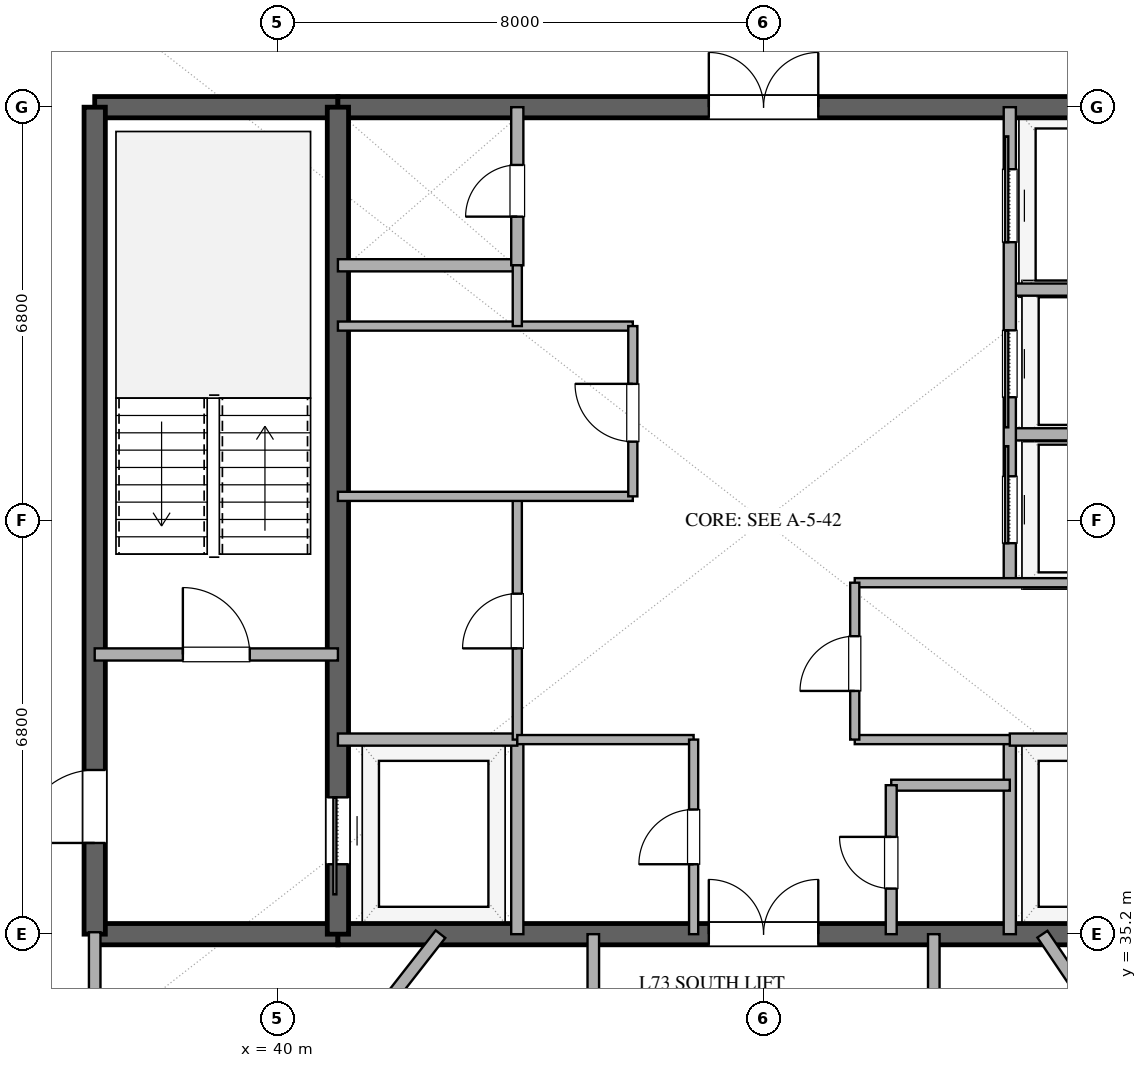
"""IFC4 building model, lengths in metres.
Left out: names, types, materials, properties, quantities, classifications, styles, units other than length and angle.
Written with IfcOpenShell. Run it as: python <this file> out.ifc"""

import sys

from ifc_helpers import new_model, si_unit, direction, frame, frame_2d, origin, place, context, subcontext, project, spatial, rectangle, extrude, element, fill, save


model = new_model("IFC4")
c1 = context("Model", 3, precision=1e-05, world=origin(), true_north=direction((0.0, 1.0)))
c2 = subcontext(c1, "Body", "Model", "MODEL_VIEW")
j1 = project(units=[si_unit("LENGTHUNIT", "METRE"), si_unit("PLANEANGLEUNIT", "RADIAN")], contexts=[c1])
p1 = place(None, origin())
s1 = spatial("IfcSite", under=j1, at=p1, CompositionType="ELEMENT")
p2 = place(p1, origin())
s2 = spatial("IfcBuilding", under=s1, at=p2, CompositionType="ELEMENT")
p3 = place(p2, frame((0.0, 0.0, 283.8)))
s3 = spatial("IfcBuildingStorey", under=s2, at=p3, CompositionType="ELEMENT", Elevation=283.8)
p4 = place(p3, frame((37.0, 35.2, 0.0), z_axis=(0.0, 0.0, 1.0), x_axis=(1.0, 0.0, 0.0)))
e1 = element("IfcWall", 1, at=p4, inside=s3, PredefinedType="SHEAR", context=c2, shape_type="SweptSolid", body=[
    extrude(rectangle(XDim=4.0, YDim=0.35, at=frame_2d((2.0, 0.0))), origin(), (0.0, 0.0, 1.0), 3.37),
])
p5 = place(p3, frame((41.0, 35.2, 0.0), z_axis=(0.0, 0.0, 1.0), x_axis=(1.0, 0.0, 0.0)))
e2 = element("IfcWall", 2, at=p5, inside=s3, PredefinedType="SHEAR", context=c2, shape_type="SweptSolid", body=[
    extrude(rectangle(XDim=14.0, YDim=0.35, at=frame_2d((7.0, 0.0))), origin(), (0.0, 0.0, 1.0), 3.37),
])
p6 = place(p5, frame((6.1, 0.0, 0.0)))
e3 = element("IfcOpeningElement", 3, at=p6, cuts=e2, PredefinedType="OPENING", context=c2, shape_type="SweptSolid", body=[
    extrude(rectangle(XDim=1.8, YDim=2.25, at=frame_2d((0.9, 1.125))), frame((0.0, 0.185, 0.0), z_axis=(0.0, -1.0, 0.0), x_axis=(1.0, 0.0, 0.0)), (0.0, 0.0, 1.0), 0.37),
])
p7 = place(p3, frame((37.0, 48.8, 0.0), z_axis=(0.0, 0.0, 1.0), x_axis=(1.0, 0.0, 0.0)))
e4 = element("IfcWall", 4, at=p7, inside=s3, PredefinedType="SHEAR", context=c2, shape_type="SweptSolid", body=[
    extrude(rectangle(XDim=4.0, YDim=0.35, at=frame_2d((2.0, 0.0))), origin(), (0.0, 0.0, 1.0), 3.37),
])
p8 = place(p3, frame((41.0, 48.8, 0.0), z_axis=(0.0, 0.0, 1.0), x_axis=(1.0, 0.0, 0.0)))
e5 = element("IfcWall", 5, at=p8, inside=s3, PredefinedType="SHEAR", context=c2, shape_type="SweptSolid", body=[
    extrude(rectangle(XDim=14.0, YDim=0.35, at=frame_2d((7.0, 0.0))), origin(), (0.0, 0.0, 1.0), 3.37),
])
p9 = place(p8, frame((6.1, 0.0, 0.0)))
e6 = element("IfcOpeningElement", 6, at=p9, cuts=e5, PredefinedType="OPENING", context=c2, shape_type="SweptSolid", body=[
    extrude(rectangle(XDim=1.8, YDim=2.25, at=frame_2d((0.9, 1.125))), frame((0.0, 0.185, 0.0), z_axis=(0.0, -1.0, 0.0), x_axis=(1.0, 0.0, 0.0)), (0.0, 0.0, 1.0), 0.37),
])
p10 = place(p3, frame((37.0, 35.2, 0.0), z_axis=(0.0, 0.0, 1.0), x_axis=(0.0, 1.0, 0.0)))
e7 = element("IfcWall", 7, at=p10, inside=s3, PredefinedType="SHEAR", context=c2, shape_type="SweptSolid", body=[
    extrude(rectangle(XDim=13.6, YDim=0.35, at=frame_2d((6.8, 0.0))), origin(), (0.0, 0.0, 1.0), 3.37),
])
p11 = place(p10, frame((1.5, 0.0, 0.0)))
e8 = element("IfcOpeningElement", 8, at=p11, cuts=e7, PredefinedType="OPENING", context=c2, shape_type="SweptSolid", body=[
    extrude(rectangle(XDim=1.2, YDim=2.15, at=frame_2d((0.6, 1.075))), frame((0.0, 0.185, 0.0), z_axis=(0.0, -1.0, 0.0), x_axis=(1.0, 0.0, 0.0)), (0.0, 0.0, 1.0), 0.37),
])
p12 = place(p3, frame((41.0, 35.2, 0.0), z_axis=(0.0, 0.0, 1.0), x_axis=(0.0, 1.0, 0.0)))
e9 = element("IfcWall", 9, at=p12, inside=s3, PredefinedType="SHEAR", context=c2, shape_type="SweptSolid", body=[
    extrude(rectangle(XDim=13.6, YDim=0.35, at=frame_2d((6.8, 0.0))), origin(), (0.0, 0.0, 1.0), 3.37),
])
p13 = place(p12, frame((1.15, 0.0, 0.0)))
e10 = element("IfcOpeningElement", 10, at=p13, cuts=e9, PredefinedType="OPENING", context=c2, shape_type="SweptSolid", body=[
    extrude(rectangle(XDim=1.1, YDim=2.2, at=frame_2d((0.55, 1.1))), frame((0.0, 0.185, 0.0), z_axis=(0.0, -1.0, 0.0), x_axis=(1.0, 0.0, 0.0)), (0.0, 0.0, 1.0), 0.37),
])
p14 = place(p3, frame((37.0, 39.8, 0.0), z_axis=(0.0, 0.0, 1.0), x_axis=(1.0, 0.0, 0.0)))
e11 = element("IfcWall", 11, at=p14, inside=s3, PredefinedType="SOLIDWALL", context=c2, shape_type="SweptSolid", body=[
    extrude(rectangle(XDim=4.0, YDim=0.2, at=frame_2d((2.0, 0.0))), origin(), (0.0, 0.0, 1.0), 2.73),
])
p15 = place(p14, frame((1.45, 0.0, 0.0)))
e12 = element("IfcOpeningElement", 12, at=p15, cuts=e11, PredefinedType="OPENING", context=c2, shape_type="SweptSolid", body=[
    extrude(rectangle(XDim=1.1, YDim=2.15, at=frame_2d((0.55, 1.075))), frame((0.0, 0.11, 0.0), z_axis=(0.0, -1.0, 0.0), x_axis=(1.0, 0.0, 0.0)), (0.0, 0.0, 1.0), 0.22),
])
p16 = place(p3, frame((43.95, 35.2, 0.0), z_axis=(0.0, 0.0, 1.0), x_axis=(0.0, 1.0, 0.0)))
e13 = element("IfcWall", 13, at=p16, inside=s3, PredefinedType="SOLIDWALL", context=c2, shape_type="SweptSolid", body=[
    extrude(rectangle(XDim=3.2, YDim=0.2, at=frame_2d((1.6, 0.0))), origin(), (0.0, 0.0, 1.0), 2.73),
])
p17 = place(p3, frame((41.0, 38.4, 0.0), z_axis=(0.0, 0.0, 1.0), x_axis=(1.0, 0.0, 0.0)))
e14 = element("IfcWall", 14, at=p17, inside=s3, PredefinedType="SOLIDWALL", context=c2, shape_type="SweptSolid", body=[
    extrude(rectangle(XDim=2.95, YDim=0.2, at=frame_2d((1.475, 0.0))), origin(), (0.0, 0.0, 1.0), 2.73),
])
p18 = place(p3, frame((52.05, 35.2, 0.0), z_axis=(0.0, 0.0, 1.0), x_axis=(0.0, 1.0, 0.0)))
e15 = element("IfcWall", 15, at=p18, inside=s3, PredefinedType="SOLIDWALL", context=c2, shape_type="SweptSolid", body=[
    extrude(rectangle(XDim=3.2, YDim=0.2, at=frame_2d((1.6, 0.0))), origin(), (0.0, 0.0, 1.0), 2.73),
])
for number, where, z_axis, x_axis in (
    (16, (52.05, 38.4, 0.0), (0.0, 0.0, 1.0), (1.0, 0.0, 0.0)),
    (17, (41.0, 46.2, 0.0), (0.0, 0.0, 1.0), (1.0, 0.0, 0.0)),
):
    element("IfcWall", number, at=place(p3, frame(where, z_axis=z_axis, x_axis=x_axis)), inside=s3, PredefinedType="SOLIDWALL", context=c2, shape_type="SweptSolid", body=[
        extrude(rectangle(XDim=2.95, YDim=0.2, at=frame_2d((1.475, 0.0))), origin(), (0.0, 0.0, 1.0), 2.73),
    ])
p19 = place(p3, frame((43.95, 46.2, 0.0), z_axis=(0.0, 0.0, 1.0), x_axis=(0.0, 1.0, 0.0)))
e18 = element("IfcWall", 18, at=p19, inside=s3, PredefinedType="SOLIDWALL", context=c2, shape_type="SweptSolid", body=[
    extrude(rectangle(XDim=2.6, YDim=0.2, at=frame_2d((1.3, 0.0))), origin(), (0.0, 0.0, 1.0), 2.73),
])
p20 = place(p19, frame((0.8, 0.0, 0.0)))
e19 = element("IfcOpeningElement", 19, at=p20, cuts=e18, PredefinedType="OPENING", context=c2, shape_type="SweptSolid", body=[
    extrude(rectangle(XDim=0.85, YDim=2.15, at=frame_2d((0.425, 1.075))), frame((0.0, 0.11, 0.0), z_axis=(0.0, -1.0, 0.0), x_axis=(1.0, 0.0, 0.0)), (0.0, 0.0, 1.0), 0.22),
])
p21 = place(p3, frame((43.95, 38.4, 0.0), z_axis=(0.0, 0.0, 1.0), x_axis=(0.0, 1.0, 0.0)))
e20 = element("IfcWall", 20, at=p21, inside=s3, PredefinedType="PARTITIONING", context=c2, shape_type="SweptSolid", body=[
    extrude(rectangle(XDim=4.0, YDim=0.15, at=frame_2d((2.0, 0.0))), origin(), (0.0, 0.0, 1.0), 2.73),
])
p22 = place(p21, frame((1.5, 0.0, 0.0)))
e21 = element("IfcOpeningElement", 21, at=p22, cuts=e20, PredefinedType="OPENING", context=c2, shape_type="SweptSolid", body=[
    extrude(rectangle(XDim=0.9, YDim=2.15, at=frame_2d((0.45, 1.075))), frame((0.0, 0.085, 0.0), z_axis=(0.0, -1.0, 0.0), x_axis=(1.0, 0.0, 0.0)), (0.0, 0.0, 1.0), 0.17),
])
for number, where, z_axis, x_axis in (
    (22, (41.0, 42.4, 0.0), (0.0, 0.0, 1.0), (1.0, 0.0, 0.0)),
    (23, (41.0, 45.2, 0.0), (0.0, 0.0, 1.0), (1.0, 0.0, 0.0)),
):
    element("IfcWall", number, at=place(p3, frame(where, z_axis=z_axis, x_axis=x_axis)), inside=s3, PredefinedType="PARTITIONING", context=c2, shape_type="SweptSolid", body=[
        extrude(rectangle(XDim=4.85, YDim=0.15, at=frame_2d((2.425, 0.0))), origin(), (0.0, 0.0, 1.0), 2.73),
    ])
p23 = place(p3, frame((43.95, 45.2, 0.0), z_axis=(0.0, 0.0, 1.0), x_axis=(0.0, 1.0, 0.0)))
e24 = element("IfcWall", 24, at=p23, inside=s3, PredefinedType="PARTITIONING", context=c2, shape_type="SweptSolid", body=[
    extrude(rectangle(XDim=1.0, YDim=0.15, at=frame_2d((0.5, 0.0))), origin(), (0.0, 0.0, 1.0), 2.73),
])
p24 = place(p3, frame((45.85, 42.4, 0.0), z_axis=(0.0, 0.0, 1.0), x_axis=(0.0, 1.0, 0.0)))
e25 = element("IfcWall", 25, at=p24, inside=s3, PredefinedType="PARTITIONING", context=c2, shape_type="SweptSolid", body=[
    extrude(rectangle(XDim=2.8, YDim=0.15, at=frame_2d((1.4, 0.0))), origin(), (0.0, 0.0, 1.0), 2.73),
])
p25 = place(p24, frame((0.9, 0.0, 0.0)))
e26 = element("IfcOpeningElement", 26, at=p25, cuts=e25, PredefinedType="OPENING", context=c2, shape_type="SweptSolid", body=[
    extrude(rectangle(XDim=0.95, YDim=2.15, at=frame_2d((0.475, 1.075))), frame((0.0, 0.085, 0.0), z_axis=(0.0, -1.0, 0.0), x_axis=(1.0, 0.0, 0.0)), (0.0, 0.0, 1.0), 0.17),
])
for number, where, z_axis, x_axis in (
    (27, (52.05, 43.42, 0.0), (0.0, 0.0, 1.0), (1.0, 0.0, 0.0)),
    (28, (52.05, 45.8, 0.0), (0.0, 0.0, 1.0), (1.0, 0.0, 0.0)),
):
    element("IfcWall", number, at=place(p3, frame(where, z_axis=z_axis, x_axis=x_axis)), inside=s3, PredefinedType="SOLIDWALL", context=c2, shape_type="SweptSolid", body=[
        extrude(rectangle(XDim=2.95, YDim=0.2, at=frame_2d((1.475, 0.0))), origin(), (0.0, 0.0, 1.0), 2.73),
    ])
p26 = place(p3, frame((52.05, 40.98, 0.0), z_axis=(0.0, 0.0, 1.0), x_axis=(0.0, 1.0, 0.0)))
e29 = element("IfcWall", 29, at=p26, inside=s3, PredefinedType="SOLIDWALL", context=c2, shape_type="SweptSolid", body=[
    extrude(rectangle(XDim=7.82, YDim=0.2, at=frame_2d((3.91, 0.0))), origin(), (0.0, 0.0, 1.0), 2.73),
])
p27 = place(p26, frame((0.65, 0.0, 0.0)))
e30 = element("IfcOpeningElement", 30, at=p27, cuts=e29, PredefinedType="OPENING", context=c2, shape_type="SweptSolid", body=[
    extrude(rectangle(XDim=1.1, YDim=2.2, at=frame_2d((0.55, 1.1))), frame((0.0, 0.11, 0.0), z_axis=(0.0, -1.0, 0.0), x_axis=(1.0, 0.0, 0.0)), (0.0, 0.0, 1.0), 0.22),
])
p28 = place(p26, frame((3.05, 0.0, 0.0)))
e31 = element("IfcOpeningElement", 31, at=p28, cuts=e29, PredefinedType="OPENING", context=c2, shape_type="SweptSolid", body=[
    extrude(rectangle(XDim=1.1, YDim=2.2, at=frame_2d((0.55, 1.1))), frame((0.0, 0.11, 0.0), z_axis=(0.0, -1.0, 0.0), x_axis=(1.0, 0.0, 0.0)), (0.0, 0.0, 1.0), 0.22),
])
p29 = place(p26, frame((5.6, 0.0, 0.0)))
e32 = element("IfcOpeningElement", 32, at=p29, cuts=e29, PredefinedType="OPENING", context=c2, shape_type="SweptSolid", body=[
    extrude(rectangle(XDim=1.2, YDim=2.2, at=frame_2d((0.6, 1.1))), frame((0.0, 0.11, 0.0), z_axis=(0.0, -1.0, 0.0), x_axis=(1.0, 0.0, 0.0)), (0.0, 0.0, 1.0), 0.22),
])
p30 = place(p3, frame((49.5, 40.98, 0.0), z_axis=(0.0, 0.0, 1.0), x_axis=(1.0, 0.0, 0.0)))
e33 = element("IfcWall", 33, at=p30, inside=s3, PredefinedType="PARTITIONING", context=c2, shape_type="SweptSolid", body=[
    extrude(rectangle(XDim=5.5, YDim=0.15, at=frame_2d((2.75, 0.0))), origin(), (0.0, 0.0, 1.0), 2.73),
])
p31 = place(p3, frame((49.5, 38.4, 0.0), z_axis=(0.0, 0.0, 1.0), x_axis=(1.0, 0.0, 0.0)))
e34 = element("IfcWall", 34, at=p31, inside=s3, PredefinedType="PARTITIONING", context=c2, shape_type="SweptSolid", body=[
    extrude(rectangle(XDim=2.55, YDim=0.15, at=frame_2d((1.275, 0.0))), origin(), (0.0, 0.0, 1.0), 2.73),
])
p32 = place(p3, frame((49.5, 38.4, 0.0), z_axis=(0.0, 0.0, 1.0), x_axis=(0.0, 1.0, 0.0)))
e35 = element("IfcWall", 35, at=p32, inside=s3, PredefinedType="PARTITIONING", context=c2, shape_type="SweptSolid", body=[
    extrude(rectangle(XDim=2.58, YDim=0.15, at=frame_2d((1.29, 0.0))), origin(), (0.0, 0.0, 1.0), 2.73),
])
p33 = place(p32, frame((0.8, 0.0, 0.0)))
e36 = element("IfcOpeningElement", 36, at=p33, cuts=e35, PredefinedType="OPENING", context=c2, shape_type="SweptSolid", body=[
    extrude(rectangle(XDim=0.9, YDim=2.15, at=frame_2d((0.45, 1.075))), frame((0.0, 0.085, 0.0), z_axis=(0.0, -1.0, 0.0), x_axis=(1.0, 0.0, 0.0)), (0.0, 0.0, 1.0), 0.17),
])
p34 = place(p3, frame((43.95, 38.4, 0.0), z_axis=(0.0, 0.0, 1.0), x_axis=(1.0, 0.0, 0.0)))
e37 = element("IfcWall", 37, at=p34, inside=s3, PredefinedType="PARTITIONING", context=c2, shape_type="SweptSolid", body=[
    extrude(rectangle(XDim=2.9, YDim=0.15, at=frame_2d((1.45, 0.0))), origin(), (0.0, 0.0, 1.0), 2.73),
])
p35 = place(p3, frame((46.85, 35.2, 0.0), z_axis=(0.0, 0.0, 1.0), x_axis=(0.0, 1.0, 0.0)))
e38 = element("IfcWall", 38, at=p35, inside=s3, PredefinedType="PARTITIONING", context=c2, shape_type="SweptSolid", body=[
    extrude(rectangle(XDim=3.2, YDim=0.15, at=frame_2d((1.6, 0.0))), origin(), (0.0, 0.0, 1.0), 2.73),
])
p36 = place(p35, frame((1.15, 0.0, 0.0)))
e39 = element("IfcOpeningElement", 39, at=p36, cuts=e38, PredefinedType="OPENING", context=c2, shape_type="SweptSolid", body=[
    extrude(rectangle(XDim=0.9, YDim=2.15, at=frame_2d((0.45, 1.075))), frame((0.0, 0.085, 0.0), z_axis=(0.0, -1.0, 0.0), x_axis=(1.0, 0.0, 0.0)), (0.0, 0.0, 1.0), 0.17),
])
p37 = place(p3, frame((50.1, 37.65, 0.0), z_axis=(0.0, 0.0, 1.0), x_axis=(1.0, 0.0, 0.0)))
e40 = element("IfcWall", 40, at=p37, inside=s3, PredefinedType="PLUMBINGWALL", context=c2, shape_type="SweptSolid", body=[
    extrude(rectangle(XDim=1.95, YDim=0.18, at=frame_2d((0.975, 0.0))), origin(), (0.0, 0.0, 1.0), 2.73),
])
p38 = place(p3, frame((50.1, 35.2, 0.0), z_axis=(0.0, 0.0, 1.0), x_axis=(0.0, 1.0, 0.0)))
e41 = element("IfcWall", 41, at=p38, inside=s3, PredefinedType="PLUMBINGWALL", context=c2, shape_type="SweptSolid", body=[
    extrude(rectangle(XDim=2.45, YDim=0.18, at=frame_2d((1.225, 0.0))), origin(), (0.0, 0.0, 1.0), 2.73),
])
p39 = place(p38, frame((0.75, 0.0, 0.0)))
e42 = element("IfcOpeningElement", 42, at=p39, cuts=e41, PredefinedType="OPENING", context=c2, shape_type="SweptSolid", body=[
    extrude(rectangle(XDim=0.85, YDim=2.1, at=frame_2d((0.425, 1.05))), frame((0.0, 0.1, 0.0), z_axis=(0.0, -1.0, 0.0), x_axis=(1.0, 0.0, 0.0)), (0.0, 0.0, 1.0), 0.2),
])
p40 = place(p3, frame((42.687, 35.2, 0.0), z_axis=(0.0, 0.0, 1.0), x_axis=(-0.615663811723, -0.788008928208, 0.0)))
e43 = element("IfcWall", 43, at=p40, inside=s3, PredefinedType="PARTITIONING", context=c2, shape_type="SweptSolid", body=[
    extrude(rectangle(XDim=12.701, YDim=0.2, at=frame_2d((6.351, 0.0))), origin(), (0.0, 0.0, 1.0), 2.73),
])
p41 = place(p3, frame((54.97, 31.667, 0.0), z_axis=(0.0, 0.0, 1.0), x_axis=(-0.559200276542, 0.829032599308, 0.0)))
e44 = element("IfcWall", 44, at=p41, inside=s3, PredefinedType="PARTITIONING", context=c2, shape_type="SweptSolid", body=[
    extrude(rectangle(XDim=4.261, YDim=0.2, at=frame_2d((2.131, 0.0))), origin(), (0.0, 0.0, 1.0), 2.73),
])
for number, where, z_axis, x_axis in (
    (45, (50.8, 35.2, 0.0), (0.0, 0.0, 1.0), (0.0, -1.0, 0.0)),
    (46, (45.2, 33.1, 0.0), (0.0, 0.0, 1.0), (0.0, 1.0, 0.0)),
):
    element("IfcWall", number, at=place(p3, frame(where, z_axis=z_axis, x_axis=x_axis)), inside=s3, PredefinedType="PARTITIONING", context=c2, shape_type="SweptSolid", body=[
        extrude(rectangle(XDim=2.1, YDim=0.19, at=frame_2d((1.05, 0.0))), origin(), (0.0, 0.0, 1.0), 2.73),
    ])
p42 = place(p3, frame((37.0, 35.232, 0.0), z_axis=(0.0, 0.0, 1.0), x_axis=(0.0, -1.0, 0.0)))
e47 = element("IfcWall", 47, at=p42, inside=s3, PredefinedType="PARTITIONING", context=c2, shape_type="SweptSolid", body=[
    extrude(rectangle(XDim=1.232, YDim=0.19, at=frame_2d((0.616, 0.0))), origin(), (0.0, 0.0, 1.0), 2.73),
])
p43 = place(p13, origin())
e48 = element("IfcDoor", 48, at=p43, inside=s3, OperationType="SLIDING_TO_LEFT", PredefinedType="DOOR", context=c2, shape_type="SweptSolid", body=[
    extrude(rectangle(XDim=1.1, YDim=2.2, at=frame_2d((0.55, 1.1))), frame((0.0, 0.025, 0.0), z_axis=(0.0, -1.0, 0.0), x_axis=(1.0, 0.0, 0.0)), (0.0, 0.0, 1.0), 0.05),
])
fill(e10, e48)
p44 = place(p11, origin())
e49 = element("IfcDoor", 49, at=p44, inside=s3, OperationType="SINGLE_SWING_LEFT", PredefinedType="DOOR", context=c2, shape_type="SweptSolid", body=[
    extrude(rectangle(XDim=1.2, YDim=2.15, at=frame_2d((0.6, 1.075))), frame((0.0, 0.025, 0.0), z_axis=(0.0, -1.0, 0.0), x_axis=(1.0, 0.0, 0.0)), (0.0, 0.0, 1.0), 0.05),
])
fill(e8, e49)
p45 = place(p6, origin())
e50 = element("IfcDoor", 50, at=p45, inside=s3, OperationType="DOUBLE_DOOR_SINGLE_SWING", PredefinedType="DOOR", context=c2, shape_type="SweptSolid", body=[
    extrude(rectangle(XDim=1.8, YDim=2.25, at=frame_2d((0.9, 1.125))), frame((0.0, 0.025, 0.0), z_axis=(0.0, -1.0, 0.0), x_axis=(1.0, 0.0, 0.0)), (0.0, 0.0, 1.0), 0.05),
])
fill(e3, e50)
p46 = place(p9, origin())
e51 = element("IfcDoor", 51, at=p46, inside=s3, OperationType="DOUBLE_DOOR_SINGLE_SWING", PredefinedType="DOOR", context=c2, shape_type="SweptSolid", body=[
    extrude(rectangle(XDim=1.8, YDim=2.25, at=frame_2d((0.9, 1.125))), frame((0.0, 0.025, 0.0), z_axis=(0.0, -1.0, 0.0), x_axis=(1.0, 0.0, 0.0)), (0.0, 0.0, 1.0), 0.05),
])
fill(e6, e51)
p47 = place(p15, origin())
e52 = element("IfcDoor", 52, at=p47, inside=s3, OperationType="SINGLE_SWING_LEFT", PredefinedType="DOOR", context=c2, shape_type="SweptSolid", body=[
    extrude(rectangle(XDim=1.1, YDim=2.15, at=frame_2d((0.55, 1.075))), frame((0.0, 0.025, 0.0), z_axis=(0.0, -1.0, 0.0), x_axis=(1.0, 0.0, 0.0)), (0.0, 0.0, 1.0), 0.05),
])
fill(e12, e52)
p48 = place(p20, origin())
e53 = element("IfcDoor", 53, at=p48, inside=s3, OperationType="SINGLE_SWING_LEFT", PredefinedType="DOOR", context=c2, shape_type="SweptSolid", body=[
    extrude(rectangle(XDim=0.85, YDim=2.15, at=frame_2d((0.425, 1.075))), frame((0.0, 0.025, 0.0), z_axis=(0.0, -1.0, 0.0), x_axis=(1.0, 0.0, 0.0)), (0.0, 0.0, 1.0), 0.05),
])
fill(e19, e53)
p49 = place(p22, origin())
e54 = element("IfcDoor", 54, at=p49, inside=s3, OperationType="SINGLE_SWING_LEFT", PredefinedType="DOOR", context=c2, shape_type="SweptSolid", body=[
    extrude(rectangle(XDim=0.9, YDim=2.15, at=frame_2d((0.45, 1.075))), frame((0.0, 0.025, 0.0), z_axis=(0.0, -1.0, 0.0), x_axis=(1.0, 0.0, 0.0)), (0.0, 0.0, 1.0), 0.05),
])
fill(e21, e54)
p50 = place(p25, origin())
e55 = element("IfcDoor", 55, at=p50, inside=s3, OperationType="SINGLE_SWING_RIGHT", PredefinedType="DOOR", context=c2, shape_type="SweptSolid", body=[
    extrude(rectangle(XDim=0.95, YDim=2.15, at=frame_2d((0.475, 1.075))), frame((0.0, 0.025, 0.0), z_axis=(0.0, -1.0, 0.0), x_axis=(1.0, 0.0, 0.0)), (0.0, 0.0, 1.0), 0.05),
])
fill(e26, e55)
p51 = place(p27, origin())
e56 = element("IfcDoor", 56, at=p51, inside=s3, OperationType="SLIDING_TO_RIGHT", PredefinedType="DOOR", context=c2, shape_type="SweptSolid", body=[
    extrude(rectangle(XDim=1.1, YDim=2.2, at=frame_2d((0.55, 1.1))), frame((0.0, 0.025, 0.0), z_axis=(0.0, -1.0, 0.0), x_axis=(1.0, 0.0, 0.0)), (0.0, 0.0, 1.0), 0.05),
])
fill(e30, e56)
p52 = place(p28, origin())
e57 = element("IfcDoor", 57, at=p52, inside=s3, OperationType="SLIDING_TO_LEFT", PredefinedType="DOOR", context=c2, shape_type="SweptSolid", body=[
    extrude(rectangle(XDim=1.1, YDim=2.2, at=frame_2d((0.55, 1.1))), frame((0.0, 0.025, 0.0), z_axis=(0.0, -1.0, 0.0), x_axis=(1.0, 0.0, 0.0)), (0.0, 0.0, 1.0), 0.05),
])
fill(e31, e57)
p53 = place(p29, origin())
e58 = element("IfcDoor", 58, at=p53, inside=s3, OperationType="SLIDING_TO_RIGHT", PredefinedType="DOOR", context=c2, shape_type="SweptSolid", body=[
    extrude(rectangle(XDim=1.2, YDim=2.2, at=frame_2d((0.6, 1.1))), frame((0.0, 0.025, 0.0), z_axis=(0.0, -1.0, 0.0), x_axis=(1.0, 0.0, 0.0)), (0.0, 0.0, 1.0), 0.05),
])
fill(e32, e58)
p54 = place(p33, origin())
e59 = element("IfcDoor", 59, at=p54, inside=s3, OperationType="SINGLE_SWING_LEFT", PredefinedType="DOOR", context=c2, shape_type="SweptSolid", body=[
    extrude(rectangle(XDim=0.9, YDim=2.15, at=frame_2d((0.45, 1.075))), frame((0.0, 0.025, 0.0), z_axis=(0.0, -1.0, 0.0), x_axis=(1.0, 0.0, 0.0)), (0.0, 0.0, 1.0), 0.05),
])
fill(e36, e59)
p55 = place(p36, origin())
e60 = element("IfcDoor", 60, at=p55, inside=s3, OperationType="SINGLE_SWING_LEFT", PredefinedType="DOOR", context=c2, shape_type="SweptSolid", body=[
    extrude(rectangle(XDim=0.9, YDim=2.15, at=frame_2d((0.45, 1.075))), frame((0.0, 0.025, 0.0), z_axis=(0.0, -1.0, 0.0), x_axis=(1.0, 0.0, 0.0)), (0.0, 0.0, 1.0), 0.05),
])
fill(e39, e60)
p56 = place(p39, origin())
e61 = element("IfcDoor", 61, at=p56, inside=s3, OperationType="SINGLE_SWING_RIGHT", PredefinedType="DOOR", context=c2, shape_type="SweptSolid", body=[
    extrude(rectangle(XDim=0.85, YDim=2.1, at=frame_2d((0.425, 1.05))), frame((0.0, 0.025, 0.0), z_axis=(0.0, -1.0, 0.0), x_axis=(1.0, 0.0, 0.0)), (0.0, 0.0, 1.0), 0.05),
])
fill(e42, e61)
save(model, sys.argv[1])
